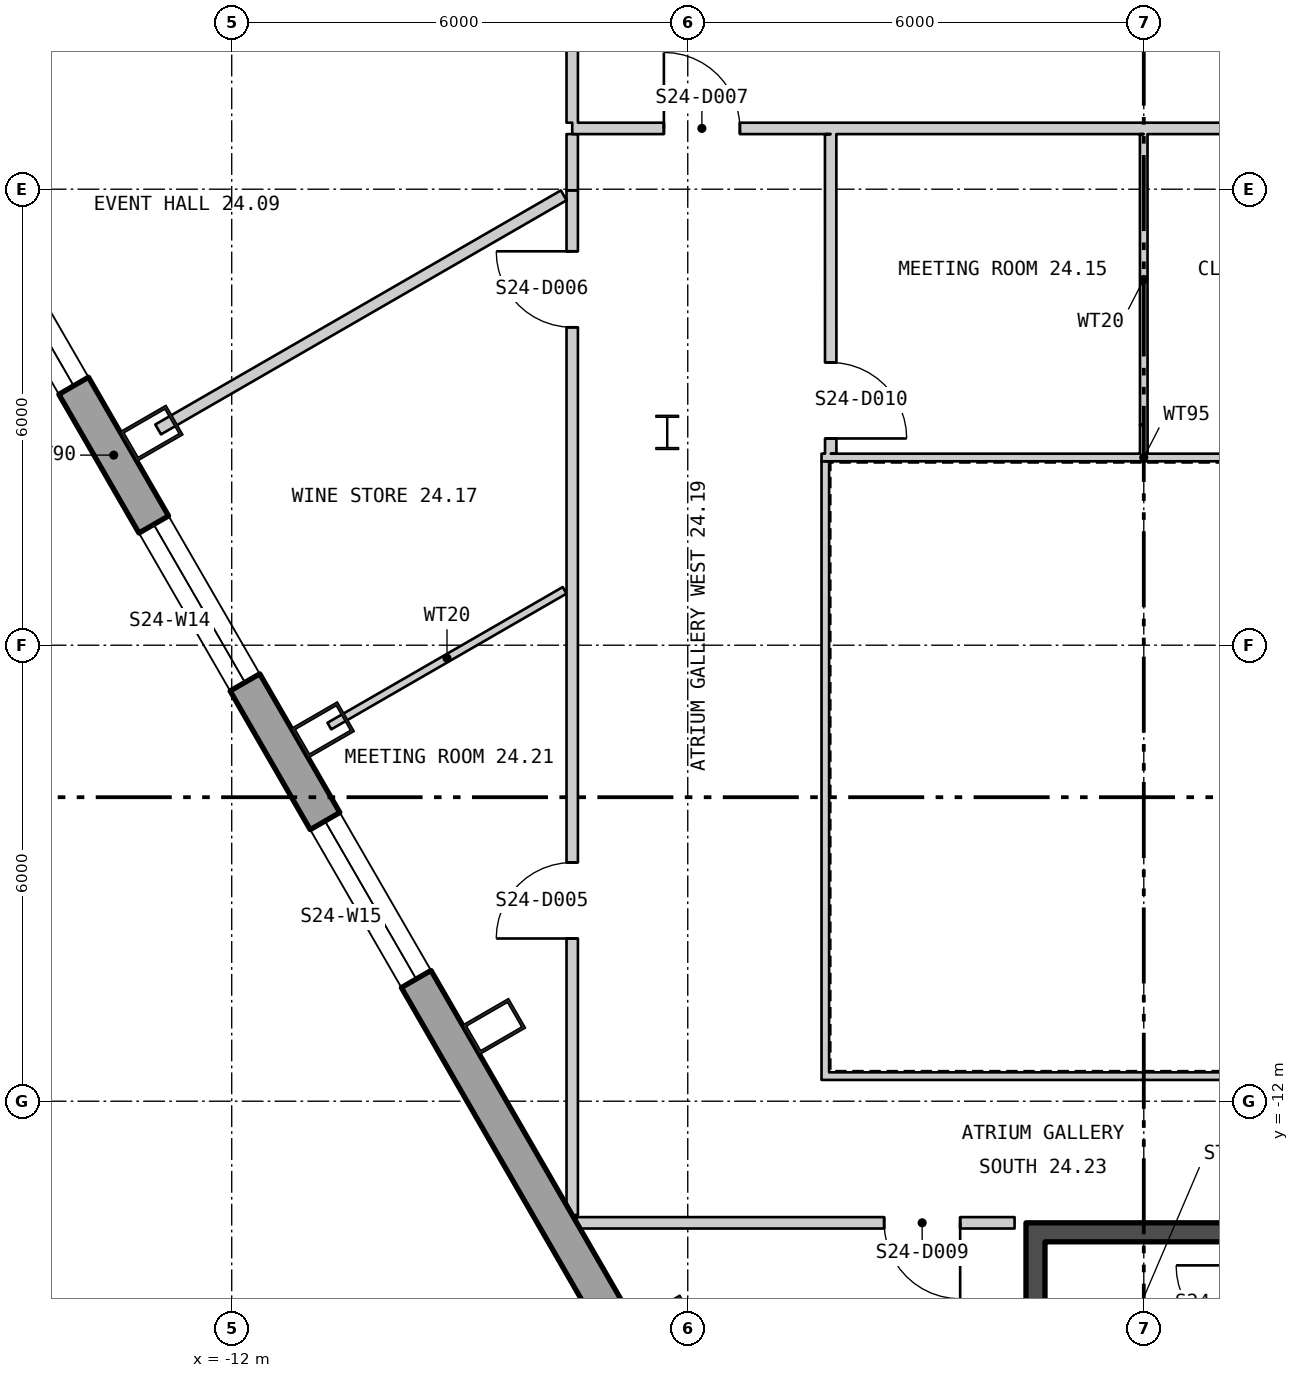
"""IFC4 building model, lengths in metres.
Left out: names, types, materials, properties, quantities, classifications, styles, units other than length and angle.
Written with IfcOpenShell. Run it as: python <this file> out.ifc"""

import sys

from ifc_helpers import new_model, si_unit, direction, frame, frame_2d, origin, origin_2d, place, context, subcontext, project, spatial, polyline, rectangle, hollow_rectangle, i_section, outline, extrude, element, fill, save


model = new_model("IFC4")
c1 = context("Model", 3, precision=1e-05, world=origin(), true_north=direction((0.0, 1.0)))
c2 = subcontext(c1, "Body", "Model", "MODEL_VIEW")
j1 = project(units=[si_unit("LENGTHUNIT", "METRE"), si_unit("PLANEANGLEUNIT", "RADIAN")], contexts=[c1])
p1 = place(None, origin())
s1 = spatial("IfcSite", under=j1, at=p1, CompositionType="ELEMENT")
p2 = place(p1, origin())
s2 = spatial("IfcBuilding", under=s1, at=p2, CompositionType="ELEMENT")
p3 = place(p2, frame((0.0, 0.0, 312.6)))
s3 = spatial("IfcBuildingStorey", under=s2, at=p3, CompositionType="ELEMENT", Elevation=312.6)
for number, where, z_axis, x_axis in (
    (1, (-13.055, -3.211, 0.0), (0.0, 0.0, 1.0), (0.5, -0.866, 0.0)),
    (2, (-10.801, -7.114, 0.0), (0.0, 0.0, 1.0), (0.5, -0.866, 0.0)),
    (3, (-8.548, -11.017, 0.0), (0.0, 0.0, 1.0), (0.5, -0.866, 0.0)),
    (4, (-6.295, -14.92, 0.0), (0.0, 0.0, 1.0), (0.5, -0.866, 0.0)),
):
    element("IfcColumn", number, at=place(p3, frame(where, z_axis=z_axis, x_axis=x_axis)), inside=s3, PredefinedType="COLUMN", context=c2, shape_type="SweptSolid", body=[
        extrude(hollow_rectangle(XDim=0.45, YDim=0.7, WallThickness=0.04, at=origin_2d()), origin(), (0.0, 0.0, 1.0), 4.2),
    ])
p4 = place(p3, frame((-6.27, -3.2, 0.0), z_axis=(0.0, 0.0, 1.0), x_axis=(1.0, 0.0, 0.0)))
e5 = element("IfcColumn", 5, at=p4, inside=s3, PredefinedType="COLUMN", context=c2, shape_type="SweptSolid", body=[
    extrude(i_section(OverallWidth=0.3, OverallDepth=0.45, WebThickness=0.014, FlangeThickness=0.026, at=origin_2d()), origin(), (0.0, 0.0, 1.0), 4.2),
])
p5 = place(p3, frame((-24.985, 16.303, -0.18), z_axis=(0.0, 0.0, 1.0), x_axis=(0.500000141277, -0.866025322218, 0.0)))
e6 = element("IfcWall", 6, at=p5, inside=s3, PredefinedType="SOLIDWALL", context=c2, shape_type="SweptSolid", body=[
    extrude(outline(polyline([(-0.13, -0.225), (45.86, -0.225), (45.6, 0.225), (0.13, 0.225), (-0.13, -0.225)])), origin(), (0.0, 0.0, 1.0), 3.98),
])
p6 = place(p5, frame((1.424, 0.0, 1.08)))
e7 = element("IfcOpeningElement", 7, at=p6, cuts=e6, PredefinedType="OPENING", context=c2, shape_type="SweptSolid", body=[
    extrude(rectangle(XDim=2.4, YDim=2.3, at=frame_2d((1.2, 1.15))), frame((0.0, 0.235, 0.0), z_axis=(0.0, -1.0, 0.0), x_axis=(1.0, 0.0, 0.0)), (0.0, 0.0, 1.0), 0.47),
])
p7 = place(p5, frame((5.892, 0.0, 1.08)))
e8 = element("IfcOpeningElement", 8, at=p7, cuts=e6, PredefinedType="OPENING", context=c2, shape_type="SweptSolid", body=[
    extrude(rectangle(XDim=2.4, YDim=2.3, at=frame_2d((1.2, 1.15))), frame((0.0, 0.235, 0.0), z_axis=(0.0, -1.0, 0.0), x_axis=(1.0, 0.0, 0.0)), (0.0, 0.0, 1.0), 0.47),
])
p8 = place(p5, frame((10.399, 0.0, 1.08)))
e9 = element("IfcOpeningElement", 9, at=p8, cuts=e6, PredefinedType="OPENING", context=c2, shape_type="SweptSolid", body=[
    extrude(rectangle(XDim=2.4, YDim=2.3, at=frame_2d((1.2, 1.15))), frame((0.0, 0.235, 0.0), z_axis=(0.0, -1.0, 0.0), x_axis=(1.0, 0.0, 0.0)), (0.0, 0.0, 1.0), 0.47),
])
p9 = place(p5, frame((14.905, 0.0, 1.08)))
e10 = element("IfcOpeningElement", 10, at=p9, cuts=e6, PredefinedType="OPENING", context=c2, shape_type="SweptSolid", body=[
    extrude(rectangle(XDim=2.4, YDim=2.3, at=frame_2d((1.2, 1.15))), frame((0.0, 0.235, 0.0), z_axis=(0.0, -1.0, 0.0), x_axis=(1.0, 0.0, 0.0)), (0.0, 0.0, 1.0), 0.47),
])
p10 = place(p5, frame((19.412, 0.0, 1.08)))
e11 = element("IfcOpeningElement", 11, at=p10, cuts=e6, PredefinedType="OPENING", context=c2, shape_type="SweptSolid", body=[
    extrude(rectangle(XDim=2.4, YDim=2.3, at=frame_2d((1.2, 1.15))), frame((0.0, 0.235, 0.0), z_axis=(0.0, -1.0, 0.0), x_axis=(1.0, 0.0, 0.0)), (0.0, 0.0, 1.0), 0.47),
])
p11 = place(p5, frame((23.918, 0.0, 1.08)))
e12 = element("IfcOpeningElement", 12, at=p11, cuts=e6, PredefinedType="OPENING", context=c2, shape_type="SweptSolid", body=[
    extrude(rectangle(XDim=2.4, YDim=2.3, at=frame_2d((1.2, 1.15))), frame((0.0, 0.235, 0.0), z_axis=(0.0, -1.0, 0.0), x_axis=(1.0, 0.0, 0.0)), (0.0, 0.0, 1.0), 0.47),
])
p12 = place(p5, frame((28.425, 0.0, 1.08)))
e13 = element("IfcOpeningElement", 13, at=p12, cuts=e6, PredefinedType="OPENING", context=c2, shape_type="SweptSolid", body=[
    extrude(rectangle(XDim=2.4, YDim=2.3, at=frame_2d((1.2, 1.15))), frame((0.0, 0.235, 0.0), z_axis=(0.0, -1.0, 0.0), x_axis=(1.0, 0.0, 0.0)), (0.0, 0.0, 1.0), 0.47),
])
p13 = place(p5, frame((37.438, 0.0, 1.08)))
e14 = element("IfcOpeningElement", 14, at=p13, cuts=e6, PredefinedType="OPENING", context=c2, shape_type="SweptSolid", body=[
    extrude(rectangle(XDim=2.4, YDim=2.3, at=frame_2d((1.2, 1.15))), frame((0.0, 0.235, 0.0), z_axis=(0.0, -1.0, 0.0), x_axis=(1.0, 0.0, 0.0)), (0.0, 0.0, 1.0), 0.47),
])
p14 = place(p5, frame((41.907, 0.0, 1.08)))
e15 = element("IfcOpeningElement", 15, at=p14, cuts=e6, PredefinedType="OPENING", context=c2, shape_type="SweptSolid", body=[
    extrude(rectangle(XDim=2.4, YDim=2.3, at=frame_2d((1.2, 1.15))), frame((0.0, 0.235, 0.0), z_axis=(0.0, -1.0, 0.0), x_axis=(1.0, 0.0, 0.0)), (0.0, 0.0, 1.0), 0.47),
])
for number, where, z_axis, x_axis in (
    (16, (-4.24, -11.67, 0.0), (0.0, 0.0, 1.0), (1.0, 0.0, 0.0)),
    (17, (4.24, -3.53, 0.0), (0.0, 0.0, 1.0), (-1.0, 0.0, 0.0)),
):
    element("IfcWall", number, at=place(p3, frame(where, z_axis=z_axis, x_axis=x_axis)), inside=s3, PredefinedType="PARTITIONING", context=c2, shape_type="SweptSolid", body=[
        extrude(rectangle(XDim=8.48, YDim=0.1, at=frame_2d((4.24, 0.0))), origin(), (0.0, 0.0, 1.0), 4.0),
    ])
p15 = place(p3, frame((-4.19, -3.58, 0.0), z_axis=(0.0, 0.0, 1.0), x_axis=(0.0, -1.0, 0.0)))
e18 = element("IfcWall", 18, at=p15, inside=s3, PredefinedType="PARTITIONING", context=c2, shape_type="SweptSolid", body=[
    extrude(rectangle(XDim=8.04, YDim=0.1, at=frame_2d((4.02, 0.0))), origin(), (0.0, 0.0, 1.0), 4.0),
])
p16 = place(p3, frame((-1.425, -21.05, 0.0), z_axis=(0.0, 0.0, 1.0), x_axis=(0.0, 1.0, 0.0)))
e19 = element("IfcWall", 19, at=p16, inside=s3, PredefinedType="SHEAR", context=c2, shape_type="SweptSolid", body=[
    extrude(rectangle(XDim=7.2, YDim=0.25, at=frame_2d((3.6, 0.0))), origin(), (0.0, 0.0, 1.0), 4.0),
])
p17 = place(p3, frame((-1.55, -13.725, 0.0), z_axis=(0.0, 0.0, 1.0), x_axis=(1.0, 0.0, 0.0)))
e20 = element("IfcWall", 20, at=p17, inside=s3, PredefinedType="SHEAR", context=c2, shape_type="SweptSolid", body=[
    extrude(rectangle(XDim=3.1, YDim=0.25, at=frame_2d((1.55, 0.0))), origin(), (0.0, 0.0, 1.0), 4.0),
])
p18 = place(p3, frame((-12.968, -3.161, 0.0), z_axis=(0.0, 0.0, 1.0), x_axis=(0.8660774803, 0.499909789979, 0.0)))
e21 = element("IfcWall", 21, at=p18, inside=s3, PredefinedType="PARTITIONING", context=c2, shape_type="SweptSolid", body=[
    extrude(rectangle(XDim=6.161, YDim=0.15, at=frame_2d((3.081, 0.0))), origin(), (0.0, 0.0, 1.0), 4.0),
])
p19 = place(p3, frame((-10.715, -7.064, 0.0), z_axis=(0.0, 0.0, 1.0), x_axis=(0.866134332687, 0.499811282126, 0.0)))
e22 = element("IfcWall", 22, at=p19, inside=s3, PredefinedType="PARTITIONING", context=c2, shape_type="SweptSolid", body=[
    extrude(rectangle(XDim=3.573, YDim=0.1, at=frame_2d((1.787, 0.0))), origin(), (0.0, 0.0, 1.0), 4.0),
])
p20 = place(p3, frame((-7.52, -13.498, 0.0), z_axis=(0.0, 0.0, 1.0), x_axis=(0.0, 1.0, 0.0)))
e23 = element("IfcWall", 23, at=p20, inside=s3, PredefinedType="PARTITIONING", context=c2, shape_type="SweptSolid", body=[
    extrude(rectangle(XDim=13.482, YDim=0.15, at=frame_2d((6.741, 0.0))), origin(), (0.0, 0.0, 1.0), 4.0),
])
p21 = place(p20, frame((3.639, 0.0, 0.0)))
e24 = element("IfcOpeningElement", 24, at=p21, cuts=e23, PredefinedType="OPENING", context=c2, shape_type="SweptSolid", body=[
    extrude(rectangle(XDim=1.0, YDim=2.1, at=frame_2d((0.5, 1.05))), frame((0.0, 0.085, 0.0), z_axis=(0.0, -1.0, 0.0), x_axis=(1.0, 0.0, 0.0)), (0.0, 0.0, 1.0), 0.17),
])
p22 = place(p20, frame((11.681, 0.0, 0.0)))
e25 = element("IfcOpeningElement", 25, at=p22, cuts=e23, PredefinedType="OPENING", context=c2, shape_type="SweptSolid", body=[
    extrude(rectangle(XDim=1.0, YDim=2.1, at=frame_2d((0.5, 1.05))), frame((0.0, 0.085, 0.0), z_axis=(0.0, -1.0, 0.0), x_axis=(1.0, 0.0, 0.0)), (0.0, 0.0, 1.0), 0.17),
])
p23 = place(p3, frame((-7.52, -0.014, 0.0), z_axis=(0.0, 0.0, 1.0), x_axis=(0.0, 1.0, 0.0)))
e26 = element("IfcWall", 26, at=p23, inside=s3, PredefinedType="PARTITIONING", context=c2, shape_type="SweptSolid", body=[
    extrude(rectangle(XDim=0.739, YDim=0.15, at=frame_2d((0.369, 0.0))), origin(), (0.0, 0.0, 1.0), 4.0),
])
p24 = place(p3, frame((-7.52, 0.8, 0.0), z_axis=(0.0, 0.0, 1.0), x_axis=(1.0, 0.0, 0.0)))
e27 = element("IfcWall", 27, at=p24, inside=s3, PredefinedType="PARTITIONING", context=c2, shape_type="SweptSolid", body=[
    extrude(rectangle(XDim=14.965, YDim=0.15, at=frame_2d((7.482, 0.0))), origin(), (0.0, 0.0, 1.0), 4.0),
])
p25 = place(p24, frame((1.206, 0.0, 0.0)))
e28 = element("IfcOpeningElement", 28, at=p25, cuts=e27, PredefinedType="OPENING", context=c2, shape_type="SweptSolid", body=[
    extrude(rectangle(XDim=1.0, YDim=2.1, at=frame_2d((0.5, 1.05))), frame((0.0, 0.085, 0.0), z_axis=(0.0, -1.0, 0.0), x_axis=(1.0, 0.0, 0.0)), (0.0, 0.0, 1.0), 0.17),
])
p26 = place(p24, frame((12.796, 0.0, 0.0)))
e29 = element("IfcOpeningElement", 29, at=p26, cuts=e27, PredefinedType="OPENING", context=c2, shape_type="SweptSolid", body=[
    extrude(rectangle(XDim=1.0, YDim=2.1, at=frame_2d((0.5, 1.05))), frame((0.0, 0.085, 0.0), z_axis=(0.0, -1.0, 0.0), x_axis=(1.0, 0.0, 0.0)), (0.0, 0.0, 1.0), 0.17),
])
p27 = place(p3, frame((-7.52, 0.875, 0.0), z_axis=(0.0, 0.0, 1.0), x_axis=(0.0, 1.0, 0.0)))
e30 = element("IfcWall", 30, at=p27, inside=s3, PredefinedType="PARTITIONING", context=c2, shape_type="SweptSolid", body=[
    extrude(rectangle(XDim=1.25, YDim=0.15, at=frame_2d((0.625, 0.0))), origin(), (0.0, 0.0, 1.0), 4.0),
])
p28 = place(p3, frame((-7.461, -13.6, 0.0), z_axis=(0.0, 0.0, 1.0), x_axis=(1.0, 0.0, 0.0)))
e31 = element("IfcWall", 31, at=p28, inside=s3, PredefinedType="PARTITIONING", context=c2, shape_type="SweptSolid", body=[
    extrude(rectangle(XDim=0.606, YDim=0.15, at=frame_2d((0.303, 0.0))), origin(), (0.0, 0.0, 1.0), 4.0),
])
p29 = place(p3, frame((-6.855, -13.6, 0.0), z_axis=(0.0, 0.0, 1.0), x_axis=(1.0, 0.0, 0.0)))
e32 = element("IfcWall", 32, at=p29, inside=s3, PredefinedType="PARTITIONING", context=c2, shape_type="SweptSolid", body=[
    extrude(rectangle(XDim=5.155, YDim=0.15, at=frame_2d((2.578, 0.0))), origin(), (0.0, 0.0, 1.0), 3.21),
])
p30 = place(p29, frame((3.439, 0.0, 0.0)))
e33 = element("IfcOpeningElement", 33, at=p30, cuts=e32, PredefinedType="OPENING", context=c2, shape_type="SweptSolid", body=[
    extrude(rectangle(XDim=1.0, YDim=2.1, at=frame_2d((0.5, 1.05))), frame((0.0, 0.085, 0.0), z_axis=(0.0, -1.0, 0.0), x_axis=(1.0, 0.0, 0.0)), (0.0, 0.0, 1.0), 0.17),
])
p31 = place(p3, frame((-4.12, 0.725, 0.0), z_axis=(0.0, 0.0, 1.0), x_axis=(0.000237812122, -0.999999971723, 0.0)))
e34 = element("IfcWall", 34, at=p31, inside=s3, PredefinedType="PARTITIONING", context=c2, shape_type="SweptSolid", body=[
    extrude(rectangle(XDim=4.205, YDim=0.15, at=frame_2d((2.103, 0.0))), origin(), (0.0, 0.0, 1.0), 4.0),
])
p32 = place(p31, frame((3.005, 0.0, 0.0)))
e35 = element("IfcOpeningElement", 35, at=p32, cuts=e34, PredefinedType="OPENING", context=c2, shape_type="SweptSolid", body=[
    extrude(rectangle(XDim=1.0, YDim=2.1, at=frame_2d((0.5, 1.05))), frame((0.0, 0.085, 0.0), z_axis=(0.0, -1.0, 0.0), x_axis=(1.0, 0.0, 0.0)), (0.0, 0.0, 1.0), 0.17),
])
p33 = place(p3, frame((-0.001, 0.725, 0.0), z_axis=(0.0, 0.0, 1.0), x_axis=(0.000235294111, -0.999999972318, 0.0)))
e36 = element("IfcWall", 36, at=p33, inside=s3, PredefinedType="PARTITIONING", context=c2, shape_type="SweptSolid", body=[
    extrude(rectangle(XDim=3.825, YDim=0.1, at=frame_2d((1.913, 0.0))), origin(), (0.0, 0.0, 1.0), 3.55),
])
p34 = place(p3, frame((-0.0, -3.1, 0.0), z_axis=(0.0, 0.0, 1.0), x_axis=(0.000263157886, -0.999999965374, 0.0)))
e37 = element("IfcWall", 37, at=p34, inside=s3, PredefinedType="PARTITIONING", context=c2, shape_type="SweptSolid", body=[
    extrude(rectangle(XDim=0.38, YDim=0.1, at=frame_2d((0.19, 0.0))), origin(), (0.0, 0.0, 1.0), 4.0),
])
p35 = place(p10, origin())
e38 = element("IfcWindow", 38, at=p35, inside=s3, PartitioningType="SINGLE_PANEL", PredefinedType="WINDOW", context=c2, shape_type="SweptSolid", body=[
    extrude(rectangle(XDim=2.4, YDim=2.3, at=frame_2d((1.2, 1.15))), frame((0.0, 0.105, 0.0), z_axis=(0.0, -1.0, 0.0), x_axis=(1.0, 0.0, 0.0)), (0.0, 0.0, 1.0), 0.06),
])
fill(e11, e38)
p36 = place(p11, origin())
e39 = element("IfcWindow", 39, at=p36, inside=s3, PartitioningType="SINGLE_PANEL", PredefinedType="WINDOW", context=c2, shape_type="SweptSolid", body=[
    extrude(rectangle(XDim=2.4, YDim=2.3, at=frame_2d((1.2, 1.15))), frame((0.0, 0.105, 0.0), z_axis=(0.0, -1.0, 0.0), x_axis=(1.0, 0.0, 0.0)), (0.0, 0.0, 1.0), 0.06),
])
fill(e12, e39)
p37 = place(p12, origin())
e40 = element("IfcWindow", 40, at=p37, inside=s3, PartitioningType="SINGLE_PANEL", PredefinedType="WINDOW", context=c2, shape_type="SweptSolid", body=[
    extrude(rectangle(XDim=2.4, YDim=2.3, at=frame_2d((1.2, 1.15))), frame((0.0, 0.105, 0.0), z_axis=(0.0, -1.0, 0.0), x_axis=(1.0, 0.0, 0.0)), (0.0, 0.0, 1.0), 0.06),
])
fill(e13, e40)
p38 = place(p21, origin())
e41 = element("IfcDoor", 41, at=p38, inside=s3, OperationType="SINGLE_SWING_RIGHT", PredefinedType="DOOR", context=c2, shape_type="SweptSolid", body=[
    extrude(rectangle(XDim=1.0, YDim=2.1, at=frame_2d((0.5, 1.05))), frame((0.0, 0.025, 0.0), z_axis=(0.0, -1.0, 0.0), x_axis=(1.0, 0.0, 0.0)), (0.0, 0.0, 1.0), 0.05),
])
fill(e24, e41)
p39 = place(p22, origin())
e42 = element("IfcDoor", 42, at=p39, inside=s3, OperationType="SINGLE_SWING_LEFT", PredefinedType="DOOR", context=c2, shape_type="SweptSolid", body=[
    extrude(rectangle(XDim=1.0, YDim=2.1, at=frame_2d((0.5, 1.05))), frame((0.0, 0.025, 0.0), z_axis=(0.0, -1.0, 0.0), x_axis=(1.0, 0.0, 0.0)), (0.0, 0.0, 1.0), 0.05),
])
fill(e25, e42)
p40 = place(p25, origin())
e43 = element("IfcDoor", 43, at=p40, inside=s3, OperationType="SINGLE_SWING_RIGHT", PredefinedType="DOOR", context=c2, shape_type="SweptSolid", body=[
    extrude(rectangle(XDim=1.0, YDim=2.1, at=frame_2d((0.5, 1.05))), frame((0.0, 0.025, 0.0), z_axis=(0.0, -1.0, 0.0), x_axis=(1.0, 0.0, 0.0)), (0.0, 0.0, 1.0), 0.05),
])
fill(e28, e43)
p41 = place(p30, origin())
e44 = element("IfcDoor", 44, at=p41, inside=s3, OperationType="SINGLE_SWING_RIGHT", PredefinedType="DOOR", context=c2, shape_type="SweptSolid", body=[
    extrude(rectangle(XDim=1.0, YDim=2.1, at=frame_2d((0.5, 1.05))), frame((0.0, 0.025, 0.0), z_axis=(0.0, -1.0, 0.0), x_axis=(1.0, 0.0, 0.0)), (0.0, 0.0, 1.0), 0.05),
])
fill(e33, e44)
p42 = place(p32, origin())
e45 = element("IfcDoor", 45, at=p42, inside=s3, OperationType="SINGLE_SWING_LEFT", PredefinedType="DOOR", context=c2, shape_type="SweptSolid", body=[
    extrude(rectangle(XDim=1.0, YDim=2.1, at=frame_2d((0.5, 1.05))), frame((0.0, 0.025, 0.0), z_axis=(0.0, -1.0, 0.0), x_axis=(1.0, 0.0, 0.0)), (0.0, 0.0, 1.0), 0.05),
])
fill(e35, e45)
save(model, sys.argv[1])
